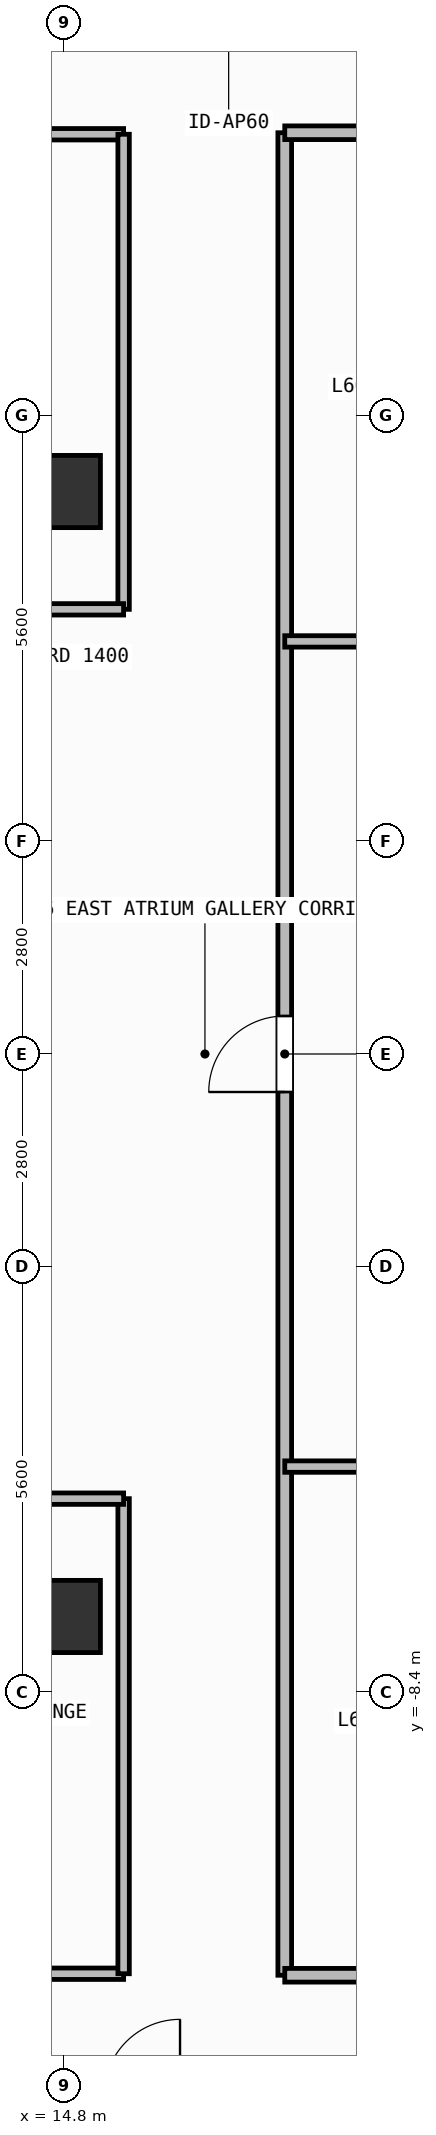
"""IFC4 building model, lengths in metres.
Left out: names, types, materials, properties, quantities, classifications, styles, units other than length and angle.
Written with IfcOpenShell. Run it as: python <this file> out.ifc"""

import sys

from ifc_helpers import new_model, si_unit, direction, frame, frame_2d, origin, origin_2d, place, context, subcontext, project, spatial, rectangle, extrude, element, fill, save


model = new_model("IFC4")
c1 = context("Model", 3, precision=1e-05, world=origin(), true_north=direction((0.0, 1.0)))
c2 = subcontext(c1, "Body", "Model", "MODEL_VIEW")
j1 = project(units=[si_unit("LENGTHUNIT", "METRE"), si_unit("PLANEANGLEUNIT", "RADIAN")], contexts=[c1])
p1 = place(None, origin())
s1 = spatial("IfcSite", under=j1, at=p1, CompositionType="ELEMENT")
p2 = place(p1, origin())
s2 = spatial("IfcBuilding", under=s1, at=p2, CompositionType="ELEMENT")
p3 = place(p2, frame((0.0, 0.0, 270.3)))
s3 = spatial("IfcBuildingStorey", under=s2, at=p3, CompositionType="ELEMENT", Elevation=270.3)
for number, where, z_axis, x_axis in (
    (1, (14.8, -7.4, 0.0), (0.0, 0.0, 1.0), (1.0, 0.0, 0.0)),
    (2, (14.8, 7.4, 0.0), (0.0, 0.0, 1.0), (1.0, 0.0, 0.0)),
):
    element("IfcColumn", number, at=place(p3, frame(where, z_axis=z_axis, x_axis=x_axis)), inside=s3, PredefinedType="COLUMN", context=c2, shape_type="SweptSolid", body=[
        extrude(rectangle(XDim=0.95, YDim=0.95, at=origin_2d()), origin(), (0.0, 0.0, 1.0), 3.9),
    ])
p4 = place(p3, frame((10.1, -12.1, 0.0), z_axis=(0.0, 0.0, 1.0), x_axis=(1.0, 0.0, 0.0)))
e3 = element("IfcWall", 3, at=p4, inside=s3, PredefinedType="PARTITIONING", context=c2, shape_type="SweptSolid", body=[
    extrude(rectangle(XDim=5.48, YDim=0.15, at=frame_2d((2.74, 0.0))), origin(), (0.0, 0.0, 1.0), 3.68),
])
p5 = place(p4, frame((2.29, 0.0, 0.0)))
e4 = element("IfcOpeningElement", 4, at=p5, cuts=e3, PredefinedType="OPENING", context=c2, shape_type="SweptSolid", body=[
    extrude(rectangle(XDim=0.9, YDim=2.1, at=frame_2d((0.45, 1.05))), frame((0.0, 0.085, 0.0), z_axis=(0.0, -1.0, 0.0), x_axis=(1.0, 0.0, 0.0)), (0.0, 0.0, 1.0), 0.17),
])
p6 = place(p3, frame((8.36, 12.1, 0.0), z_axis=(0.0, 0.0, 1.0), x_axis=(1.0, 0.0, 0.0)))
e5 = element("IfcWall", 5, at=p6, inside=s3, PredefinedType="PARTITIONING", context=c2, shape_type="SweptSolid", body=[
    extrude(rectangle(XDim=7.22, YDim=0.15, at=frame_2d((3.61, 0.0))), origin(), (0.0, 0.0, 1.0), 3.68),
])
p7 = place(p6, frame((3.513, 0.0, 0.0)))
e6 = element("IfcOpeningElement", 6, at=p7, cuts=e5, PredefinedType="OPENING", context=c2, shape_type="SweptSolid", body=[
    extrude(rectangle(XDim=0.9, YDim=2.1, at=frame_2d((0.45, 1.05))), frame((0.0, 0.085, 0.0), z_axis=(0.0, -1.0, 0.0), x_axis=(1.0, 0.0, 0.0)), (0.0, 0.0, 1.0), 0.17),
])
p8 = place(p3, frame((17.7, -12.12, 0.0), z_axis=(0.0, 0.0, 1.0), x_axis=(0.0, 1.0, 0.0)))
e7 = element("IfcWall", 7, at=p8, inside=s3, PredefinedType="PARTITIONING", context=c2, shape_type="SweptSolid", body=[
    extrude(rectangle(XDim=24.24, YDim=0.18, at=frame_2d((12.12, 0.0))), origin(), (0.0, 0.0, 1.0), 3.68),
])
p9 = place(p8, frame((11.62, 0.0, 0.0)))
e8 = element("IfcOpeningElement", 8, at=p9, cuts=e7, PredefinedType="OPENING", context=c2, shape_type="SweptSolid", body=[
    extrude(rectangle(XDim=1.0, YDim=2.2, at=frame_2d((0.5, 1.1))), frame((0.0, 0.1, 0.0), z_axis=(0.0, -1.0, 0.0), x_axis=(1.0, 0.0, 0.0)), (0.0, 0.0, 1.0), 0.2),
])
p10 = place(p3, frame((17.7, 5.428, 0.0), z_axis=(0.0, 0.0, 1.0), x_axis=(1.0, 0.0, 0.0)))
e9 = element("IfcWall", 9, at=p10, inside=s3, PredefinedType="PARTITIONING", context=c2, shape_type="SweptSolid", body=[
    extrude(rectangle(XDim=3.677, YDim=0.15, at=frame_2d((1.838, 0.0))), origin(), (0.0, 0.0, 1.0), 3.68),
])
p11 = place(p10, frame((2.309, 0.0, 0.0)))
e10 = element("IfcOpeningElement", 10, at=p11, cuts=e9, PredefinedType="OPENING", context=c2, shape_type="SweptSolid", body=[
    extrude(rectangle(XDim=0.85, YDim=2.1, at=frame_2d((0.425, 1.05))), frame((0.0, 0.085, 0.0), z_axis=(0.0, -1.0, 0.0), x_axis=(1.0, 0.0, 0.0)), (0.0, 0.0, 1.0), 0.17),
])
p12 = place(p3, frame((17.7, -5.428, 0.0), z_axis=(0.0, 0.0, 1.0), x_axis=(1.0, 0.0, 0.0)))
e11 = element("IfcWall", 11, at=p12, inside=s3, PredefinedType="PARTITIONING", context=c2, shape_type="SweptSolid", body=[
    extrude(rectangle(XDim=3.677, YDim=0.15, at=frame_2d((1.838, 0.0))), origin(), (0.0, 0.0, 1.0), 3.68),
])
p13 = place(p12, frame((2.309, 0.0, 0.0)))
e12 = element("IfcOpeningElement", 12, at=p13, cuts=e11, PredefinedType="OPENING", context=c2, shape_type="SweptSolid", body=[
    extrude(rectangle(XDim=0.85, YDim=2.1, at=frame_2d((0.425, 1.05))), frame((0.0, 0.085, 0.0), z_axis=(0.0, -1.0, 0.0), x_axis=(1.0, 0.0, 0.0)), (0.0, 0.0, 1.0), 0.17),
])
p14 = place(p3, frame((15.58, -12.1, 0.0), z_axis=(0.0, 0.0, 1.0), x_axis=(0.0, 1.0, 0.0)))
e13 = element("IfcWall", 13, at=p14, inside=s3, PredefinedType="PARTITIONING", context=c2, shape_type="SweptSolid", body=[
    extrude(rectangle(XDim=6.25, YDim=0.15, at=frame_2d((3.125, 0.0))), origin(), (0.0, 0.0, 1.0), 3.68),
])
p15 = place(p3, frame((8.96, -5.85, 0.0), z_axis=(0.0, 0.0, 1.0), x_axis=(1.0, 0.0, 0.0)))
e14 = element("IfcWall", 14, at=p15, inside=s3, PredefinedType="PARTITIONING", context=c2, shape_type="SweptSolid", body=[
    extrude(rectangle(XDim=6.62, YDim=0.15, at=frame_2d((3.31, 0.0))), origin(), (0.0, 0.0, 1.0), 3.68),
])
p16 = place(p3, frame((15.58, 5.85, 0.0), z_axis=(0.0, 0.0, 1.0), x_axis=(0.0, 1.0, 0.0)))
e15 = element("IfcWall", 15, at=p16, inside=s3, PredefinedType="PARTITIONING", context=c2, shape_type="SweptSolid", body=[
    extrude(rectangle(XDim=6.25, YDim=0.15, at=frame_2d((3.125, 0.0))), origin(), (0.0, 0.0, 1.0), 3.68),
])
p17 = place(p3, frame((8.96, 5.85, 0.0), z_axis=(0.0, 0.0, 1.0), x_axis=(1.0, 0.0, 0.0)))
e16 = element("IfcWall", 16, at=p17, inside=s3, PredefinedType="PARTITIONING", context=c2, shape_type="SweptSolid", body=[
    extrude(rectangle(XDim=6.62, YDim=0.15, at=frame_2d((3.31, 0.0))), origin(), (0.0, 0.0, 1.0), 3.68),
])
for number, where, z_axis, x_axis in (
    (17, (17.7, -12.12, 0.0), (0.0, 0.0, 1.0), (1.0, 0.0, 0.0)),
    (18, (17.7, 12.12, 0.0), (0.0, 0.0, 1.0), (1.0, 0.0, 0.0)),
):
    element("IfcWall", number, at=place(p3, frame(where, z_axis=z_axis, x_axis=x_axis)), inside=s3, PredefinedType="PARTITIONING", context=c2, shape_type="SweptSolid", body=[
        extrude(rectangle(XDim=7.03, YDim=0.18, at=frame_2d((3.515, 0.0))), origin(), (0.0, 0.0, 1.0), 3.68),
    ])
p18 = place(p9, origin())
e19 = element("IfcDoor", 19, at=p18, inside=s3, OperationType="SINGLE_SWING_LEFT", PredefinedType="DOOR", context=c2, shape_type="SweptSolid", body=[
    extrude(rectangle(XDim=1.0, YDim=2.2, at=frame_2d((0.5, 1.1))), frame((0.0, 0.025, 0.0), z_axis=(0.0, -1.0, 0.0), x_axis=(1.0, 0.0, 0.0)), (0.0, 0.0, 1.0), 0.05),
])
fill(e8, e19)
save(model, sys.argv[1])
